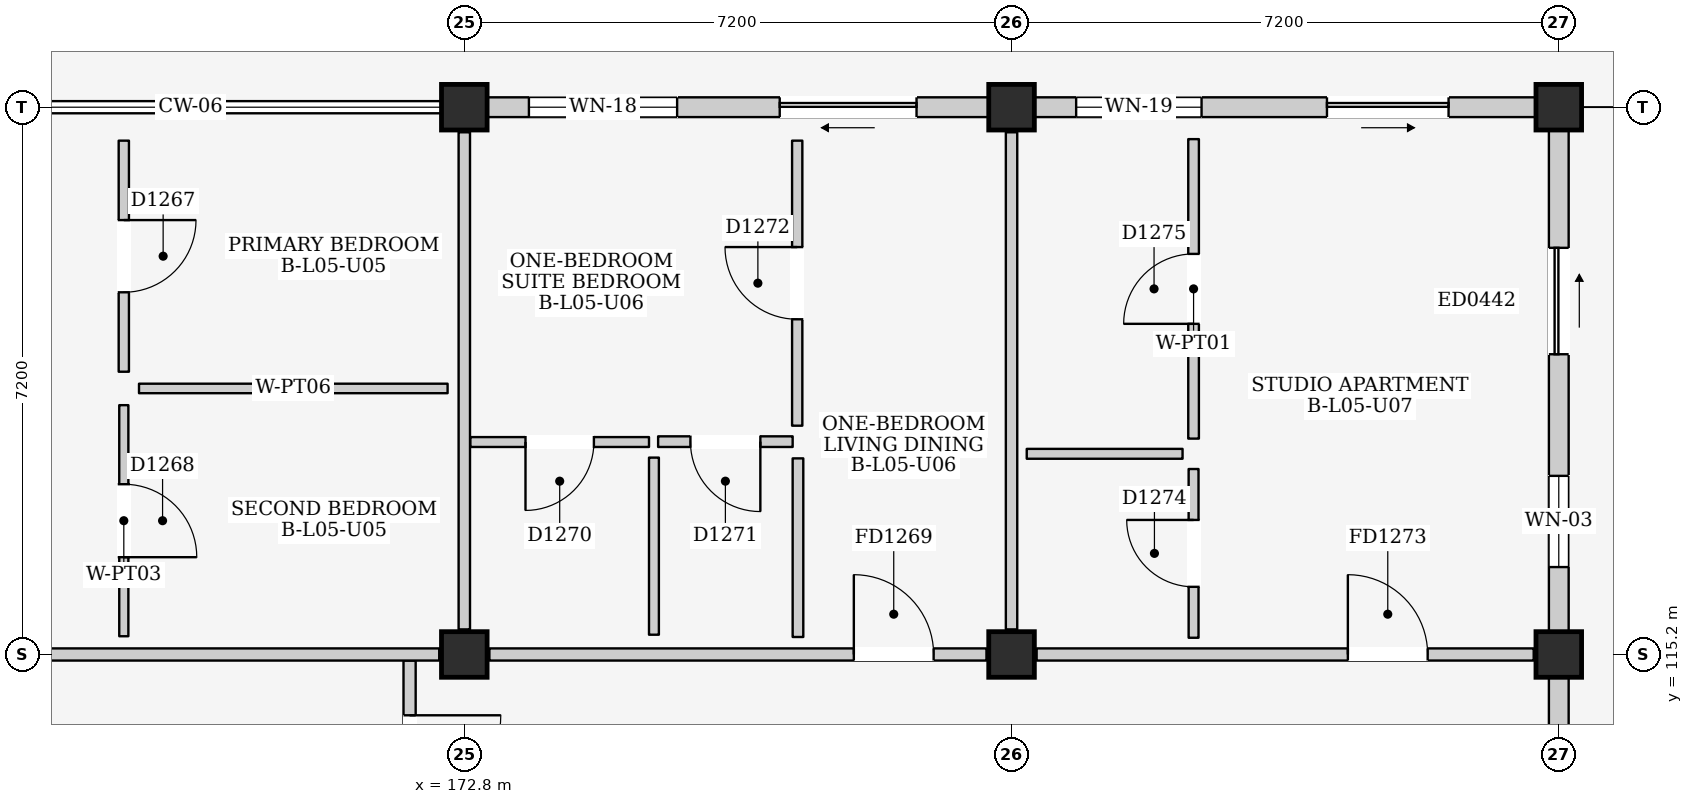
"""IFC4 building model, lengths in metres.
Left out: names, types, materials, properties, quantities, classifications, styles, units other than length and angle.
Written with IfcOpenShell. Run it as: python <this file> out.ifc"""

import sys

from ifc_helpers import new_model, si_unit, direction, frame, frame_2d, origin, origin_2d, place, context, subcontext, project, spatial, rectangle, extrude, element, fill, save


model = new_model("IFC4")
c1 = context("Model", 3, precision=1e-05, world=origin(), true_north=direction((0.0, 1.0)))
c2 = subcontext(c1, "Body", "Model", "MODEL_VIEW")
j1 = project(units=[si_unit("LENGTHUNIT", "METRE"), si_unit("PLANEANGLEUNIT", "RADIAN")], contexts=[c1])
p1 = place(None, origin())
s1 = spatial("IfcSite", under=j1, at=p1, CompositionType="ELEMENT")
p2 = place(p1, origin())
s2 = spatial("IfcBuilding", under=s1, at=p2, CompositionType="ELEMENT")
p3 = place(p2, frame((0.0, 0.0, 18.6)))
s3 = spatial("IfcBuildingStorey", under=s2, at=p3, CompositionType="ELEMENT", Elevation=18.6)
for number, where, z_axis, x_axis in (
    (1, (172.8, 115.2, 0.0), (0.0, 0.0, 1.0), (1.0, 0.0, 0.0)),
    (2, (172.8, 122.4, 0.0), (0.0, 0.0, 1.0), (1.0, 0.0, 0.0)),
    (3, (180.0, 115.2, 0.0), (0.0, 0.0, 1.0), (1.0, 0.0, 0.0)),
    (4, (180.0, 122.4, 0.0), (0.0, 0.0, 1.0), (1.0, 0.0, 0.0)),
    (5, (187.2, 115.2, 0.0), (0.0, 0.0, 1.0), (1.0, 0.0, 0.0)),
    (6, (187.2, 122.4, 0.0), (0.0, 0.0, 1.0), (1.0, 0.0, 0.0)),
):
    element("IfcColumn", number, at=place(p3, frame(where, z_axis=z_axis, x_axis=x_axis)), inside=s3, PredefinedType="COLUMN", context=c2, shape_type="SweptSolid", body=[
        extrude(rectangle(XDim=0.6, YDim=0.6, at=origin_2d()), origin(), (0.0, 0.0, 1.0), 3.3),
    ])
p4 = place(p3, frame((173.1, 122.4, 0.0), z_axis=(0.0, 0.0, 1.0), x_axis=(1.0, 0.0, 0.0)))
e7 = element("IfcWall", 7, at=p4, inside=s3, PredefinedType="ELEMENTEDWALL", context=c2, shape_type="SweptSolid", body=[
    extrude(rectangle(XDim=6.6, YDim=0.26, at=frame_2d((3.3, 0.0))), origin(), (0.0, 0.0, 1.0), 2.595),
])
p5 = place(p4, frame((3.85, 0.0, 0.0)))
e8 = element("IfcOpeningElement", 8, at=p5, cuts=e7, PredefinedType="OPENING", context=c2, shape_type="SweptSolid", body=[
    extrude(rectangle(XDim=1.8, YDim=2.12, at=frame_2d((0.9, 1.06))), frame((0.0, 0.145, 0.0), z_axis=(0.0, -1.0, 0.0), x_axis=(1.0, 0.0, 0.0)), (0.0, 0.0, 1.0), 0.29),
])
p6 = place(p4, frame((0.55, 0.0, 0.9)))
e9 = element("IfcOpeningElement", 9, at=p6, cuts=e7, PredefinedType="OPENING", context=c2, shape_type="SweptSolid", body=[
    extrude(rectangle(XDim=1.95, YDim=1.55, at=frame_2d((0.975, 0.775))), frame((0.0, 0.145, 0.0), z_axis=(0.0, -1.0, 0.0), x_axis=(1.0, 0.0, 0.0)), (0.0, 0.0, 1.0), 0.29),
])
p7 = place(p3, frame((187.2, 108.3, 0.0), z_axis=(0.0, 0.0, 1.0), x_axis=(0.0, 1.0, 0.0)))
e10 = element("IfcWall", 10, at=p7, inside=s3, PredefinedType="ELEMENTEDWALL", context=c2, shape_type="SweptSolid", body=[
    extrude(rectangle(XDim=6.6, YDim=0.26, at=frame_2d((3.3, 0.0))), origin(), (0.0, 0.0, 1.0), 2.595),
])
p8 = place(p7, frame((3.65, 0.0, 0.0)))
e11 = element("IfcOpeningElement", 11, at=p8, cuts=e10, PredefinedType="OPENING", context=c2, shape_type="SweptSolid", body=[
    extrude(rectangle(XDim=1.4, YDim=2.1, at=frame_2d((0.7, 1.05))), frame((0.0, 0.145, 0.0), z_axis=(0.0, -1.0, 0.0), x_axis=(1.0, 0.0, 0.0)), (0.0, 0.0, 1.0), 0.29),
])
p9 = place(p3, frame((180.3, 122.4, 0.0), z_axis=(0.0, 0.0, 1.0), x_axis=(1.0, 0.0, 0.0)))
e12 = element("IfcWall", 12, at=p9, inside=s3, PredefinedType="ELEMENTEDWALL", context=c2, shape_type="SweptSolid", body=[
    extrude(rectangle(XDim=6.6, YDim=0.26, at=frame_2d((3.3, 0.0))), origin(), (0.0, 0.0, 1.0), 2.595),
])
p10 = place(p9, frame((3.85, 0.0, 0.0)))
e13 = element("IfcOpeningElement", 13, at=p10, cuts=e12, PredefinedType="OPENING", context=c2, shape_type="SweptSolid", body=[
    extrude(rectangle(XDim=1.6, YDim=2.12, at=frame_2d((0.8, 1.06))), frame((0.0, 0.145, 0.0), z_axis=(0.0, -1.0, 0.0), x_axis=(1.0, 0.0, 0.0)), (0.0, 0.0, 1.0), 0.29),
])
p11 = place(p9, frame((0.55, 0.0, 0.9)))
e14 = element("IfcOpeningElement", 14, at=p11, cuts=e12, PredefinedType="OPENING", context=c2, shape_type="SweptSolid", body=[
    extrude(rectangle(XDim=1.65, YDim=1.35, at=frame_2d((0.825, 0.675))), frame((0.0, 0.145, 0.0), z_axis=(0.0, -1.0, 0.0), x_axis=(1.0, 0.0, 0.0)), (0.0, 0.0, 1.0), 0.29),
])
p12 = place(p3, frame((187.2, 115.5, 0.0), z_axis=(0.0, 0.0, 1.0), x_axis=(0.0, 1.0, 0.0)))
e15 = element("IfcWall", 15, at=p12, inside=s3, PredefinedType="ELEMENTEDWALL", context=c2, shape_type="SweptSolid", body=[
    extrude(rectangle(XDim=6.6, YDim=0.26, at=frame_2d((3.3, 0.0))), origin(), (0.0, 0.0, 1.0), 2.595),
])
p13 = place(p12, frame((3.65, 0.0, 0.0)))
e16 = element("IfcOpeningElement", 16, at=p13, cuts=e15, PredefinedType="OPENING", context=c2, shape_type="SweptSolid", body=[
    extrude(rectangle(XDim=1.4, YDim=2.1, at=frame_2d((0.7, 1.05))), frame((0.0, 0.145, 0.0), z_axis=(0.0, -1.0, 0.0), x_axis=(1.0, 0.0, 0.0)), (0.0, 0.0, 1.0), 0.29),
])
p14 = place(p12, frame((0.85, 0.0, 0.95)))
e17 = element("IfcOpeningElement", 17, at=p14, cuts=e15, PredefinedType="OPENING", context=c2, shape_type="SweptSolid", body=[
    extrude(rectangle(XDim=1.2, YDim=1.35, at=frame_2d((0.6, 0.675))), frame((0.0, 0.145, 0.0), z_axis=(0.0, -1.0, 0.0), x_axis=(1.0, 0.0, 0.0)), (0.0, 0.0, 1.0), 0.29),
])
p15 = place(p3, frame((172.08, 110.8, 0.0), z_axis=(0.0, 0.0, 1.0), x_axis=(0.0, 1.0, 0.0)))
e18 = element("IfcWall", 18, at=p15, inside=s3, PredefinedType="PARTITIONING", context=c2, shape_type="SweptSolid", body=[
    extrude(rectangle(XDim=4.32, YDim=0.16, at=frame_2d((2.16, 0.0))), origin(), (0.0, 0.0, 1.0), 3.06),
])
p16 = place(p15, frame((2.4, 0.0, 0.0)))
e19 = element("IfcOpeningElement", 19, at=p16, cuts=e18, PredefinedType="OPENING", context=c2, shape_type="SweptSolid", body=[
    extrude(rectangle(XDim=1.2, YDim=2.2, at=frame_2d((0.6, 1.1))), frame((0.0, 0.095, 0.0), z_axis=(0.0, -1.0, 0.0), x_axis=(1.0, 0.0, 0.0)), (0.0, 0.0, 1.0), 0.19),
])
p17 = place(p3, frame((165.93, 115.2, 0.0), z_axis=(0.0, 0.0, 1.0), x_axis=(1.0, 0.0, 0.0)))
e20 = element("IfcWall", 20, at=p17, inside=s3, PredefinedType="PARTITIONING", context=c2, shape_type="SweptSolid", body=[
    extrude(rectangle(XDim=6.54, YDim=0.16, at=frame_2d((3.27, 0.0))), origin(), (0.0, 0.0, 1.0), 2.445),
])
p18 = place(p3, frame((172.8, 115.53, 0.0), z_axis=(0.0, 0.0, 1.0), x_axis=(0.0, 1.0, 0.0)))
e21 = element("IfcWall", 21, at=p18, inside=s3, PredefinedType="PARTITIONING", context=c2, shape_type="SweptSolid", body=[
    extrude(rectangle(XDim=6.54, YDim=0.15, at=frame_2d((3.27, 0.0))), origin(), (0.0, 0.0, 1.0), 2.545),
])
p19 = place(p3, frame((168.32, 118.92, 0.0), z_axis=(0.0, 0.0, 1.0), x_axis=(0.0, 1.0, 0.0)))
e22 = element("IfcWall", 22, at=p19, inside=s3, PredefinedType="PARTITIONING", context=c2, shape_type="SweptSolid", body=[
    extrude(rectangle(XDim=3.04, YDim=0.135, at=frame_2d((1.52, 0.0))), origin(), (0.0, 0.0, 1.0), 3.06),
])
p20 = place(p19, frame((1.045, 0.0, 0.0)))
e23 = element("IfcOpeningElement", 23, at=p20, cuts=e22, PredefinedType="OPENING", context=c2, shape_type="SweptSolid", body=[
    extrude(rectangle(XDim=0.95, YDim=2.15, at=frame_2d((0.475, 1.075))), frame((0.0, 0.083, 0.0), z_axis=(0.0, -1.0, 0.0), x_axis=(1.0, 0.0, 0.0)), (0.0, 0.0, 1.0), 0.165),
])
p21 = place(p3, frame((168.52, 118.7, 0.0), z_axis=(0.0, 0.0, 1.0), x_axis=(1.0, 0.0, 0.0)))
e24 = element("IfcWall", 24, at=p21, inside=s3, PredefinedType="PARTITIONING", context=c2, shape_type="SweptSolid", body=[
    extrude(rectangle(XDim=4.06, YDim=0.125, at=frame_2d((2.03, 0.0))), origin(), (0.0, 0.0, 1.0), 3.06),
])
p22 = place(p3, frame((168.32, 115.44, 0.0), z_axis=(0.0, 0.0, 1.0), x_axis=(0.0, 1.0, 0.0)))
e25 = element("IfcWall", 25, at=p22, inside=s3, PredefinedType="PARTITIONING", context=c2, shape_type="SweptSolid", body=[
    extrude(rectangle(XDim=3.04, YDim=0.12, at=frame_2d((1.52, 0.0))), origin(), (0.0, 0.0, 1.0), 3.06),
])
p23 = place(p22, frame((1.04, 0.0, 0.0)))
e26 = element("IfcOpeningElement", 26, at=p23, cuts=e25, PredefinedType="OPENING", context=c2, shape_type="SweptSolid", body=[
    extrude(rectangle(XDim=0.96, YDim=2.15, at=frame_2d((0.48, 1.075))), frame((0.0, 0.075, 0.0), z_axis=(0.0, -1.0, 0.0), x_axis=(1.0, 0.0, 0.0)), (0.0, 0.0, 1.0), 0.15),
])
p24 = place(p3, frame((173.13, 115.2, 0.0), z_axis=(0.0, 0.0, 1.0), x_axis=(1.0, 0.0, 0.0)))
e27 = element("IfcWall", 27, at=p24, inside=s3, PredefinedType="PARTITIONING", context=c2, shape_type="SweptSolid", body=[
    extrude(rectangle(XDim=6.54, YDim=0.16, at=frame_2d((3.27, 0.0))), origin(), (0.0, 0.0, 1.0), 2.445),
])
p25 = place(p24, frame((4.795, 0.0, 0.0)))
e28 = element("IfcOpeningElement", 28, at=p25, cuts=e27, PredefinedType="OPENING", context=c2, shape_type="SweptSolid", body=[
    extrude(rectangle(XDim=1.05, YDim=2.15, at=frame_2d((0.525, 1.075))), frame((0.0, 0.095, 0.0), z_axis=(0.0, -1.0, 0.0), x_axis=(1.0, 0.0, 0.0)), (0.0, 0.0, 1.0), 0.19),
])
p26 = place(p3, frame((180.0, 115.53, 0.0), z_axis=(0.0, 0.0, 1.0), x_axis=(0.0, 1.0, 0.0)))
e29 = element("IfcWall", 29, at=p26, inside=s3, PredefinedType="PARTITIONING", context=c2, shape_type="SweptSolid", body=[
    extrude(rectangle(XDim=6.54, YDim=0.15, at=frame_2d((3.27, 0.0))), origin(), (0.0, 0.0, 1.0), 2.545),
])
p27 = place(p3, frame((172.88, 117.995, 0.0), z_axis=(0.0, 0.0, 1.0), x_axis=(1.0, 0.0, 0.0)))
e30 = element("IfcWall", 30, at=p27, inside=s3, PredefinedType="PARTITIONING", context=c2, shape_type="SweptSolid", body=[
    extrude(rectangle(XDim=2.35, YDim=0.13, at=frame_2d((1.175, 0.0))), origin(), (0.0, 0.0, 1.0), 3.06),
])
p28 = place(p27, frame((0.725, 0.0, 0.0)))
e31 = element("IfcOpeningElement", 31, at=p28, cuts=e30, PredefinedType="OPENING", context=c2, shape_type="SweptSolid", body=[
    extrude(rectangle(XDim=0.9, YDim=2.1, at=frame_2d((0.45, 1.05))), frame((0.0, 0.08, 0.0), z_axis=(0.0, -1.0, 0.0), x_axis=(1.0, 0.0, 0.0)), (0.0, 0.0, 1.0), 0.16),
])
p29 = place(p3, frame((175.295, 115.46, 0.0), z_axis=(0.0, 0.0, 1.0), x_axis=(0.0, 1.0, 0.0)))
e32 = element("IfcWall", 32, at=p29, inside=s3, PredefinedType="PARTITIONING", context=c2, shape_type="SweptSolid", body=[
    extrude(rectangle(XDim=2.33, YDim=0.13, at=frame_2d((1.165, 0.0))), origin(), (0.0, 0.0, 1.0), 3.06),
])
p30 = place(p3, frame((175.35, 118.0, 0.0), z_axis=(0.0, 0.0, 1.0), x_axis=(1.0, 0.0, 0.0)))
e33 = element("IfcWall", 33, at=p30, inside=s3, PredefinedType="PARTITIONING", context=c2, shape_type="SweptSolid", body=[
    extrude(rectangle(XDim=1.77, YDim=0.14, at=frame_2d((0.885, 0.0))), origin(), (0.0, 0.0, 1.0), 3.06),
])
p31 = place(p30, frame((0.425, 0.0, 0.0)))
e34 = element("IfcOpeningElement", 34, at=p31, cuts=e33, PredefinedType="OPENING", context=c2, shape_type="SweptSolid", body=[
    extrude(rectangle(XDim=0.92, YDim=2.1, at=frame_2d((0.46, 1.05))), frame((0.0, 0.085, 0.0), z_axis=(0.0, -1.0, 0.0), x_axis=(1.0, 0.0, 0.0)), (0.0, 0.0, 1.0), 0.17),
])
p32 = place(p3, frame((177.19, 115.43, 0.0), z_axis=(0.0, 0.0, 1.0), x_axis=(0.0, 1.0, 0.0)))
e35 = element("IfcWall", 35, at=p32, inside=s3, PredefinedType="PARTITIONING", context=c2, shape_type="SweptSolid", body=[
    extrude(rectangle(XDim=2.35, YDim=0.14, at=frame_2d((1.175, 0.0))), origin(), (0.0, 0.0, 1.0), 3.06),
])
p33 = place(p3, frame((177.18, 118.21, 0.0), z_axis=(0.0, 0.0, 1.0), x_axis=(0.0, 1.0, 0.0)))
e36 = element("IfcWall", 36, at=p33, inside=s3, PredefinedType="PARTITIONING", context=c2, shape_type="SweptSolid", body=[
    extrude(rectangle(XDim=3.75, YDim=0.135, at=frame_2d((1.875, 0.0))), origin(), (0.0, 0.0, 1.0), 3.06),
])
p34 = place(p33, frame((1.4, 0.0, 0.0)))
e37 = element("IfcOpeningElement", 37, at=p34, cuts=e36, PredefinedType="OPENING", context=c2, shape_type="SweptSolid", body=[
    extrude(rectangle(XDim=0.95, YDim=2.15, at=frame_2d((0.475, 1.075))), frame((0.0, 0.083, 0.0), z_axis=(0.0, -1.0, 0.0), x_axis=(1.0, 0.0, 0.0)), (0.0, 0.0, 1.0), 0.165),
])
p35 = place(p3, frame((180.33, 115.2, 0.0), z_axis=(0.0, 0.0, 1.0), x_axis=(1.0, 0.0, 0.0)))
e38 = element("IfcWall", 38, at=p35, inside=s3, PredefinedType="PARTITIONING", context=c2, shape_type="SweptSolid", body=[
    extrude(rectangle(XDim=6.54, YDim=0.16, at=frame_2d((3.27, 0.0))), origin(), (0.0, 0.0, 1.0), 2.445),
])
p36 = place(p35, frame((4.095, 0.0, 0.0)))
e39 = element("IfcOpeningElement", 39, at=p36, cuts=e38, PredefinedType="OPENING", context=c2, shape_type="SweptSolid", body=[
    extrude(rectangle(XDim=1.05, YDim=2.15, at=frame_2d((0.525, 1.075))), frame((0.0, 0.095, 0.0), z_axis=(0.0, -1.0, 0.0), x_axis=(1.0, 0.0, 0.0)), (0.0, 0.0, 1.0), 0.19),
])
p37 = place(p3, frame((180.2, 117.84, 0.0), z_axis=(0.0, 0.0, 1.0), x_axis=(1.0, 0.0, 0.0)))
e40 = element("IfcWall", 40, at=p37, inside=s3, PredefinedType="PARTITIONING", context=c2, shape_type="SweptSolid", body=[
    extrude(rectangle(XDim=2.05, YDim=0.13, at=frame_2d((1.025, 0.0))), origin(), (0.0, 0.0, 1.0), 3.06),
])
p38 = place(p3, frame((182.395, 115.42, 0.0), z_axis=(0.0, 0.0, 1.0), x_axis=(0.0, 1.0, 0.0)))
e41 = element("IfcWall", 41, at=p38, inside=s3, PredefinedType="PARTITIONING", context=c2, shape_type="SweptSolid", body=[
    extrude(rectangle(XDim=2.22, YDim=0.13, at=frame_2d((1.11, 0.0))), origin(), (0.0, 0.0, 1.0), 3.06),
])
p39 = place(p38, frame((0.67, 0.0, 0.0)))
e42 = element("IfcOpeningElement", 42, at=p39, cuts=e41, PredefinedType="OPENING", context=c2, shape_type="SweptSolid", body=[
    extrude(rectangle(XDim=0.88, YDim=2.1, at=frame_2d((0.44, 1.05))), frame((0.0, 0.08, 0.0), z_axis=(0.0, -1.0, 0.0), x_axis=(1.0, 0.0, 0.0)), (0.0, 0.0, 1.0), 0.16),
])
p40 = place(p3, frame((182.395, 118.04, 0.0), z_axis=(0.0, 0.0, 1.0), x_axis=(0.0, 1.0, 0.0)))
e43 = element("IfcWall", 43, at=p40, inside=s3, PredefinedType="PARTITIONING", context=c2, shape_type="SweptSolid", body=[
    extrude(rectangle(XDim=3.94, YDim=0.14, at=frame_2d((1.97, 0.0))), origin(), (0.0, 0.0, 1.0), 3.06),
])
p41 = place(p40, frame((1.51, 0.0, 0.0)))
e44 = element("IfcOpeningElement", 44, at=p41, cuts=e43, PredefinedType="OPENING", context=c2, shape_type="SweptSolid", body=[
    extrude(rectangle(XDim=0.92, YDim=2.1, at=frame_2d((0.46, 1.05))), frame((0.0, 0.085, 0.0), z_axis=(0.0, -1.0, 0.0), x_axis=(1.0, 0.0, 0.0)), (0.0, 0.0, 1.0), 0.17),
])
p42 = place(p5, frame((1.8, 0.0, 0.0), z_axis=(0.0, 0.0, 1.0), x_axis=(-1.0, 0.0, 0.0)))
e45 = element("IfcDoor", 45, at=p42, inside=s3, OperationType="SLIDING_TO_LEFT", PredefinedType="DOOR", context=c2, shape_type="SweptSolid", body=[
    extrude(rectangle(XDim=1.8, YDim=2.12, at=frame_2d((0.9, 1.06))), frame((0.0, 0.025, 0.0), z_axis=(0.0, -1.0, 0.0), x_axis=(1.0, 0.0, 0.0)), (0.0, 0.0, 1.0), 0.05),
])
fill(e8, e45)
p43 = place(p6, origin())
e46 = element("IfcWindow", 46, at=p43, inside=s3, PartitioningType="DOUBLE_PANEL_VERTICAL", PredefinedType="WINDOW", context=c2, shape_type="SweptSolid", body=[
    extrude(rectangle(XDim=1.95, YDim=1.55, at=frame_2d((0.975, 0.775))), frame((0.0, 0.03, 0.0), z_axis=(0.0, -1.0, 0.0), x_axis=(1.0, 0.0, 0.0)), (0.0, 0.0, 1.0), 0.06),
])
fill(e9, e46)
p44 = place(p10, frame((1.6, 0.0, 0.0), z_axis=(0.0, 0.0, 1.0), x_axis=(-1.0, 0.0, 0.0)))
e47 = element("IfcDoor", 47, at=p44, inside=s3, OperationType="SLIDING_TO_RIGHT", PredefinedType="DOOR", context=c2, shape_type="SweptSolid", body=[
    extrude(rectangle(XDim=1.6, YDim=2.12, at=frame_2d((0.8, 1.06))), frame((0.0, 0.025, 0.0), z_axis=(0.0, -1.0, 0.0), x_axis=(1.0, 0.0, 0.0)), (0.0, 0.0, 1.0), 0.05),
])
fill(e13, e47)
p45 = place(p11, origin())
e48 = element("IfcWindow", 48, at=p45, inside=s3, PartitioningType="DOUBLE_PANEL_VERTICAL", PredefinedType="WINDOW", context=c2, shape_type="SweptSolid", body=[
    extrude(rectangle(XDim=1.65, YDim=1.35, at=frame_2d((0.825, 0.675))), frame((0.0, 0.03, 0.0), z_axis=(0.0, -1.0, 0.0), x_axis=(1.0, 0.0, 0.0)), (0.0, 0.0, 1.0), 0.06),
])
fill(e14, e48)
p46 = place(p13, frame((1.4, 0.0, 0.0), z_axis=(0.0, 0.0, 1.0), x_axis=(-1.0, 0.0, 0.0)))
e49 = element("IfcDoor", 49, at=p46, inside=s3, OperationType="SLIDING_TO_RIGHT", PredefinedType="DOOR", context=c2, shape_type="SweptSolid", body=[
    extrude(rectangle(XDim=1.4, YDim=2.1, at=frame_2d((0.7, 1.05))), frame((0.0, 0.025, 0.0), z_axis=(0.0, -1.0, 0.0), x_axis=(1.0, 0.0, 0.0)), (0.0, 0.0, 1.0), 0.05),
])
fill(e16, e49)
p47 = place(p14, origin())
e50 = element("IfcWindow", 50, at=p47, inside=s3, PartitioningType="SINGLE_PANEL", PredefinedType="WINDOW", context=c2, shape_type="SweptSolid", body=[
    extrude(rectangle(XDim=1.2, YDim=1.35, at=frame_2d((0.6, 0.675))), frame((0.0, 0.03, 0.0), z_axis=(0.0, -1.0, 0.0), x_axis=(1.0, 0.0, 0.0)), (0.0, 0.0, 1.0), 0.06),
])
fill(e17, e50)
p48 = place(p16, frame((1.2, 0.0, 0.0), z_axis=(0.0, 0.0, 1.0), x_axis=(-1.0, 0.0, 0.0)))
e51 = element("IfcDoor", 51, at=p48, inside=s3, OperationType="SINGLE_SWING_LEFT", PredefinedType="DOOR", context=c2, shape_type="SweptSolid", body=[
    extrude(rectangle(XDim=1.2, YDim=2.2, at=frame_2d((0.6, 1.1))), frame((0.0, 0.025, 0.0), z_axis=(0.0, -1.0, 0.0), x_axis=(1.0, 0.0, 0.0)), (0.0, 0.0, 1.0), 0.05),
])
fill(e19, e51)
p49 = place(p20, frame((0.95, 0.0, 0.0), z_axis=(0.0, 0.0, 1.0), x_axis=(-1.0, 0.0, 0.0)))
e52 = element("IfcDoor", 52, at=p49, inside=s3, OperationType="SINGLE_SWING_LEFT", PredefinedType="DOOR", context=c2, shape_type="SweptSolid", body=[
    extrude(rectangle(XDim=0.95, YDim=2.15, at=frame_2d((0.475, 1.075))), frame((0.0, 0.025, 0.0), z_axis=(0.0, -1.0, 0.0), x_axis=(1.0, 0.0, 0.0)), (0.0, 0.0, 1.0), 0.05),
])
fill(e23, e52)
p50 = place(p23, frame((0.96, 0.0, 0.0), z_axis=(0.0, 0.0, 1.0), x_axis=(-1.0, 0.0, 0.0)))
e53 = element("IfcDoor", 53, at=p50, inside=s3, OperationType="SINGLE_SWING_RIGHT", PredefinedType="DOOR", context=c2, shape_type="SweptSolid", body=[
    extrude(rectangle(XDim=0.96, YDim=2.15, at=frame_2d((0.48, 1.075))), frame((0.0, 0.025, 0.0), z_axis=(0.0, -1.0, 0.0), x_axis=(1.0, 0.0, 0.0)), (0.0, 0.0, 1.0), 0.05),
])
fill(e26, e53)
p51 = place(p25, origin())
e54 = element("IfcDoor", 54, at=p51, inside=s3, OperationType="SINGLE_SWING_LEFT", PredefinedType="DOOR", context=c2, shape_type="SweptSolid", body=[
    extrude(rectangle(XDim=1.05, YDim=2.15, at=frame_2d((0.525, 1.075))), frame((0.0, 0.025, 0.0), z_axis=(0.0, -1.0, 0.0), x_axis=(1.0, 0.0, 0.0)), (0.0, 0.0, 1.0), 0.05),
])
fill(e28, e54)
p52 = place(p28, frame((0.9, 0.0, 0.0), z_axis=(0.0, 0.0, 1.0), x_axis=(-1.0, 0.0, 0.0)))
e55 = element("IfcDoor", 55, at=p52, inside=s3, OperationType="SINGLE_SWING_RIGHT", PredefinedType="DOOR", context=c2, shape_type="SweptSolid", body=[
    extrude(rectangle(XDim=0.9, YDim=2.1, at=frame_2d((0.45, 1.05))), frame((0.0, 0.025, 0.0), z_axis=(0.0, -1.0, 0.0), x_axis=(1.0, 0.0, 0.0)), (0.0, 0.0, 1.0), 0.05),
])
fill(e31, e55)
p53 = place(p31, frame((0.92, 0.0, 0.0), z_axis=(0.0, 0.0, 1.0), x_axis=(-1.0, 0.0, 0.0)))
e56 = element("IfcDoor", 56, at=p53, inside=s3, OperationType="SINGLE_SWING_LEFT", PredefinedType="DOOR", context=c2, shape_type="SweptSolid", body=[
    extrude(rectangle(XDim=0.92, YDim=2.1, at=frame_2d((0.46, 1.05))), frame((0.0, 0.025, 0.0), z_axis=(0.0, -1.0, 0.0), x_axis=(1.0, 0.0, 0.0)), (0.0, 0.0, 1.0), 0.05),
])
fill(e34, e56)
p54 = place(p34, origin())
e57 = element("IfcDoor", 57, at=p54, inside=s3, OperationType="SINGLE_SWING_RIGHT", PredefinedType="DOOR", context=c2, shape_type="SweptSolid", body=[
    extrude(rectangle(XDim=0.95, YDim=2.15, at=frame_2d((0.475, 1.075))), frame((0.0, 0.025, 0.0), z_axis=(0.0, -1.0, 0.0), x_axis=(1.0, 0.0, 0.0)), (0.0, 0.0, 1.0), 0.05),
])
fill(e37, e57)
p55 = place(p36, origin())
e58 = element("IfcDoor", 58, at=p55, inside=s3, OperationType="SINGLE_SWING_LEFT", PredefinedType="DOOR", context=c2, shape_type="SweptSolid", body=[
    extrude(rectangle(XDim=1.05, YDim=2.15, at=frame_2d((0.525, 1.075))), frame((0.0, 0.025, 0.0), z_axis=(0.0, -1.0, 0.0), x_axis=(1.0, 0.0, 0.0)), (0.0, 0.0, 1.0), 0.05),
])
fill(e39, e58)
p56 = place(p39, origin())
e59 = element("IfcDoor", 59, at=p56, inside=s3, OperationType="SINGLE_SWING_RIGHT", PredefinedType="DOOR", context=c2, shape_type="SweptSolid", body=[
    extrude(rectangle(XDim=0.88, YDim=2.1, at=frame_2d((0.44, 1.05))), frame((0.0, 0.025, 0.0), z_axis=(0.0, -1.0, 0.0), x_axis=(1.0, 0.0, 0.0)), (0.0, 0.0, 1.0), 0.05),
])
fill(e42, e59)
p57 = place(p41, origin())
e60 = element("IfcDoor", 60, at=p57, inside=s3, OperationType="SINGLE_SWING_LEFT", PredefinedType="DOOR", context=c2, shape_type="SweptSolid", body=[
    extrude(rectangle(XDim=0.92, YDim=2.1, at=frame_2d((0.46, 1.05))), frame((0.0, 0.025, 0.0), z_axis=(0.0, -1.0, 0.0), x_axis=(1.0, 0.0, 0.0)), (0.0, 0.0, 1.0), 0.05),
])
fill(e44, e60)
save(model, sys.argv[1])
